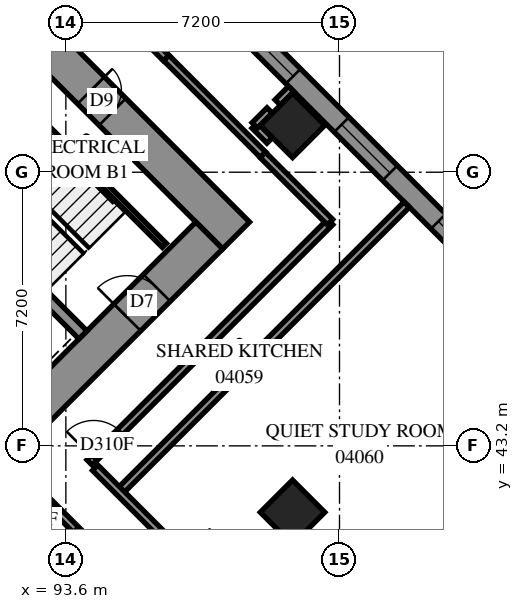
"""IFC4 building model, lengths in metres.
Left out: names, types, materials, properties, quantities, classifications, styles, units other than length and angle.
Written with IfcOpenShell. Run it as: python <this file> out.ifc"""

import sys

from ifc_helpers import new_model, si_unit, direction, frame, frame_2d, origin, origin_2d, place, context, subcontext, project, spatial, polyline, rectangle, outline, extrude, element, fill, save


model = new_model("IFC4")
c1 = context("Model", 3, precision=1e-05, world=origin(), true_north=direction((0.0, 1.0)))
c2 = subcontext(c1, "Body", "Model", "MODEL_VIEW")
j1 = project(units=[si_unit("LENGTHUNIT", "METRE"), si_unit("PLANEANGLEUNIT", "RADIAN")], contexts=[c1])
p1 = place(None, origin())
s1 = spatial("IfcSite", under=j1, at=p1, CompositionType="ELEMENT")
p2 = place(p1, origin())
s2 = spatial("IfcBuilding", under=s1, at=p2, CompositionType="ELEMENT")
p3 = place(p2, frame((0.0, 0.0, 18.6)))
s3 = spatial("IfcBuildingStorey", under=s2, at=p3, CompositionType="ELEMENT", Elevation=18.6)
for number, where, z_axis, x_axis in (
    (1, (99.565, 51.635, 0.0), (0.0, 0.0, 1.0), (0.707, -0.707, 0.0)),
    (2, (99.565, 41.453, 0.0), (0.0, 0.0, 1.0), (0.707, -0.707, 0.0)),
):
    element("IfcColumn", number, at=place(p3, frame(where, z_axis=z_axis, x_axis=x_axis)), inside=s3, PredefinedType="COLUMN", context=c2, shape_type="SweptSolid", body=[
        extrude(rectangle(XDim=1.2, YDim=1.2, at=origin_2d()), origin(), (0.0, 0.0, 1.0), 3.8),
    ])
p4 = place(p3, frame((86.483, 60.333, -0.4), z_axis=(0.0, 0.0, 1.0), x_axis=(0.70710983, -0.7071037324, 0.0)))
e3 = element("IfcWall", 3, at=p4, inside=s3, PredefinedType="SHEAR", context=c2, shape_type="SweptSolid", body=[
    extrude(rectangle(XDim=16.4, YDim=1.0, at=frame_2d((8.2, 0.0))), origin(), (0.0, 0.0, 1.0), 3.5),
])
p5 = place(p4, frame((11.0, 0.0, 0.4)))
e4 = element("IfcOpeningElement", 4, at=p5, cuts=e3, PredefinedType="OPENING", context=c2, shape_type="SweptSolid", body=[
    extrude(rectangle(XDim=0.8, YDim=2.1, at=frame_2d((0.4, 1.05))), frame((0.0, 0.51, 0.0), z_axis=(0.0, -1.0, 0.0), x_axis=(1.0, 0.0, 0.0)), (0.0, 0.0, 1.0), 1.02),
])
p6 = place(p3, frame((87.19, 38.554, -0.4), z_axis=(0.0, 0.0, 1.0), x_axis=(0.707103309, 0.7071102534, 0.0)))
e5 = element("IfcWall", 5, at=p6, inside=s3, PredefinedType="SHEAR", context=c2, shape_type="SweptSolid", body=[
    extrude(rectangle(XDim=14.4, YDim=1.0, at=frame_2d((7.2, 0.0))), origin(), (0.0, 0.0, 1.0), 3.5),
])
p7 = place(p6, frame((4.55, 0.0, 0.4)))
e6 = element("IfcOpeningElement", 6, at=p7, cuts=e5, PredefinedType="OPENING", context=c2, shape_type="SweptSolid", body=[
    extrude(rectangle(XDim=1.1, YDim=2.1, at=frame_2d((0.55, 1.05))), frame((0.0, 0.51, 0.0), z_axis=(0.0, -1.0, 0.0), x_axis=(1.0, 0.0, 0.0)), (0.0, 0.0, 1.0), 1.02),
])
p8 = place(p6, frame((11.35, 0.0, 0.4)))
e7 = element("IfcOpeningElement", 7, at=p8, cuts=e5, PredefinedType="OPENING", context=c2, shape_type="SweptSolid", body=[
    extrude(rectangle(XDim=1.1, YDim=2.1, at=frame_2d((0.55, 1.05))), frame((0.0, 0.51, 0.0), z_axis=(0.0, -1.0, 0.0), x_axis=(1.0, 0.0, 0.0)), (0.0, 0.0, 1.0), 1.02),
])
p9 = place(p3, frame((88.958, 51.211, 0.0), z_axis=(0.0, 0.0, 1.0), x_axis=(0.7070998367, -0.7071137256, 0.0)))
e8 = element("IfcWall", 8, at=p9, inside=s3, PredefinedType="SOLIDWALL", context=c2, shape_type="SweptSolid", body=[
    extrude(rectangle(XDim=7.2, YDim=0.3, at=frame_2d((3.6, 0.0))), origin(), (0.0, 0.0, 1.0), 3.8),
])
p10 = place(p3, frame((117.843, 34.665, 0.0), z_axis=(0.0, 0.0, 1.0), x_axis=(-0.7071067812, 0.7071067812, 0.0)))
e9 = element("IfcWall", 9, at=p10, inside=s3, PredefinedType="SOLIDWALL", context=c2, shape_type="SweptSolid", body=[
    extrude(outline(polyline([(-0.275, -0.275), (54.222, -0.275), (53.994, 0.275), (0.275, 0.275), (-0.275, -0.275)])), origin(), (0.0, 0.0, 1.0), 3.8),
])
p11 = place(p10, frame((0.8, 0.0, 0.7)))
e10 = element("IfcOpeningElement", 10, at=p11, cuts=e9, PredefinedType="OPENING", context=c2, shape_type="SweptSolid", body=[
    extrude(rectangle(XDim=1.8, YDim=2.4, at=frame_2d((0.9, 1.2))), frame((0.0, 0.285, 0.0), z_axis=(0.0, -1.0, 0.0), x_axis=(1.0, 0.0, 0.0)), (0.0, 0.0, 1.0), 0.57),
])
p12 = place(p10, frame((4.225, 0.0, 0.7)))
e11 = element("IfcOpeningElement", 11, at=p12, cuts=e9, PredefinedType="OPENING", context=c2, shape_type="SweptSolid", body=[
    extrude(rectangle(XDim=1.8, YDim=2.4, at=frame_2d((0.9, 1.2))), frame((0.0, 0.285, 0.0), z_axis=(0.0, -1.0, 0.0), x_axis=(1.0, 0.0, 0.0)), (0.0, 0.0, 1.0), 0.57),
])
p13 = place(p10, frame((7.825, 0.0, 0.7)))
e12 = element("IfcOpeningElement", 12, at=p13, cuts=e9, PredefinedType="OPENING", context=c2, shape_type="SweptSolid", body=[
    extrude(rectangle(XDim=1.8, YDim=2.4, at=frame_2d((0.9, 1.2))), frame((0.0, 0.285, 0.0), z_axis=(0.0, -1.0, 0.0), x_axis=(1.0, 0.0, 0.0)), (0.0, 0.0, 1.0), 0.57),
])
p14 = place(p10, frame((11.425, 0.0, 0.7)))
e13 = element("IfcOpeningElement", 13, at=p14, cuts=e9, PredefinedType="OPENING", context=c2, shape_type="SweptSolid", body=[
    extrude(rectangle(XDim=1.8, YDim=2.4, at=frame_2d((0.9, 1.2))), frame((0.0, 0.285, 0.0), z_axis=(0.0, -1.0, 0.0), x_axis=(1.0, 0.0, 0.0)), (0.0, 0.0, 1.0), 0.57),
])
p15 = place(p10, frame((15.025, 0.0, 0.7)))
e14 = element("IfcOpeningElement", 14, at=p15, cuts=e9, PredefinedType="OPENING", context=c2, shape_type="SweptSolid", body=[
    extrude(rectangle(XDim=1.8, YDim=2.4, at=frame_2d((0.9, 1.2))), frame((0.0, 0.285, 0.0), z_axis=(0.0, -1.0, 0.0), x_axis=(1.0, 0.0, 0.0)), (0.0, 0.0, 1.0), 0.57),
])
p16 = place(p10, frame((18.625, 0.0, 0.7)))
e15 = element("IfcOpeningElement", 15, at=p16, cuts=e9, PredefinedType="OPENING", context=c2, shape_type="SweptSolid", body=[
    extrude(rectangle(XDim=1.8, YDim=2.4, at=frame_2d((0.9, 1.2))), frame((0.0, 0.285, 0.0), z_axis=(0.0, -1.0, 0.0), x_axis=(1.0, 0.0, 0.0)), (0.0, 0.0, 1.0), 0.57),
])
p17 = place(p10, frame((22.225, 0.0, 0.7)))
e16 = element("IfcOpeningElement", 16, at=p17, cuts=e9, PredefinedType="OPENING", context=c2, shape_type="SweptSolid", body=[
    extrude(rectangle(XDim=1.8, YDim=2.4, at=frame_2d((0.9, 1.2))), frame((0.0, 0.285, 0.0), z_axis=(0.0, -1.0, 0.0), x_axis=(1.0, 0.0, 0.0)), (0.0, 0.0, 1.0), 0.57),
])
p18 = place(p10, frame((25.825, 0.0, 0.7)))
e17 = element("IfcOpeningElement", 17, at=p18, cuts=e9, PredefinedType="OPENING", context=c2, shape_type="SweptSolid", body=[
    extrude(rectangle(XDim=1.8, YDim=2.4, at=frame_2d((0.9, 1.2))), frame((0.0, 0.285, 0.0), z_axis=(0.0, -1.0, 0.0), x_axis=(1.0, 0.0, 0.0)), (0.0, 0.0, 1.0), 0.57),
])
p19 = place(p10, frame((29.425, 0.0, 0.7)))
e18 = element("IfcOpeningElement", 18, at=p19, cuts=e9, PredefinedType="OPENING", context=c2, shape_type="SweptSolid", body=[
    extrude(rectangle(XDim=1.8, YDim=2.4, at=frame_2d((0.9, 1.2))), frame((0.0, 0.285, 0.0), z_axis=(0.0, -1.0, 0.0), x_axis=(1.0, 0.0, 0.0)), (0.0, 0.0, 1.0), 0.57),
])
p20 = place(p10, frame((33.025, 0.0, 0.7)))
e19 = element("IfcOpeningElement", 19, at=p20, cuts=e9, PredefinedType="OPENING", context=c2, shape_type="SweptSolid", body=[
    extrude(rectangle(XDim=1.8, YDim=2.4, at=frame_2d((0.9, 1.2))), frame((0.0, 0.285, 0.0), z_axis=(0.0, -1.0, 0.0), x_axis=(1.0, 0.0, 0.0)), (0.0, 0.0, 1.0), 0.57),
])
p21 = place(p10, frame((36.625, 0.0, 0.7)))
e20 = element("IfcOpeningElement", 20, at=p21, cuts=e9, PredefinedType="OPENING", context=c2, shape_type="SweptSolid", body=[
    extrude(rectangle(XDim=1.8, YDim=2.4, at=frame_2d((0.9, 1.2))), frame((0.0, 0.285, 0.0), z_axis=(0.0, -1.0, 0.0), x_axis=(1.0, 0.0, 0.0)), (0.0, 0.0, 1.0), 0.57),
])
p22 = place(p10, frame((40.225, 0.0, 0.7)))
e21 = element("IfcOpeningElement", 21, at=p22, cuts=e9, PredefinedType="OPENING", context=c2, shape_type="SweptSolid", body=[
    extrude(rectangle(XDim=1.8, YDim=2.4, at=frame_2d((0.9, 1.2))), frame((0.0, 0.285, 0.0), z_axis=(0.0, -1.0, 0.0), x_axis=(1.0, 0.0, 0.0)), (0.0, 0.0, 1.0), 0.57),
])
p23 = place(p10, frame((43.825, 0.0, 0.7)))
e22 = element("IfcOpeningElement", 22, at=p23, cuts=e9, PredefinedType="OPENING", context=c2, shape_type="SweptSolid", body=[
    extrude(rectangle(XDim=1.8, YDim=2.4, at=frame_2d((0.9, 1.2))), frame((0.0, 0.285, 0.0), z_axis=(0.0, -1.0, 0.0), x_axis=(1.0, 0.0, 0.0)), (0.0, 0.0, 1.0), 0.57),
])
p24 = place(p10, frame((47.425, 0.0, 0.7)))
e23 = element("IfcOpeningElement", 23, at=p24, cuts=e9, PredefinedType="OPENING", context=c2, shape_type="SweptSolid", body=[
    extrude(rectangle(XDim=1.8, YDim=2.4, at=frame_2d((0.9, 1.2))), frame((0.0, 0.285, 0.0), z_axis=(0.0, -1.0, 0.0), x_axis=(1.0, 0.0, 0.0)), (0.0, 0.0, 1.0), 0.57),
])
p25 = place(p10, frame((51.06, 0.0, 0.7)))
e24 = element("IfcOpeningElement", 24, at=p25, cuts=e9, PredefinedType="OPENING", context=c2, shape_type="SweptSolid", body=[
    extrude(rectangle(XDim=1.8, YDim=2.4, at=frame_2d((0.9, 1.2))), frame((0.0, 0.285, 0.0), z_axis=(0.0, -1.0, 0.0), x_axis=(1.0, 0.0, 0.0)), (0.0, 0.0, 1.0), 0.57),
])
p26 = place(p3, frame((77.07, 42.275, 0.0), z_axis=(0.0, 0.0, 1.0), x_axis=(0.7071067812, -0.7071067812, 0.0)))
e25 = element("IfcWall", 25, at=p26, inside=s3, PredefinedType="SOLIDWALL", context=c2, shape_type="SweptSolid", body=[
    extrude(outline(polyline([(0.114, -0.275), (39.288, -0.275), (38.737, 0.275), (-0.114, 0.275), (0.114, -0.275)])), origin(), (0.0, 0.0, 1.0), 3.8),
])
p27 = place(p26, frame((2.837, 0.0, 0.7)))
e26 = element("IfcOpeningElement", 26, at=p27, cuts=e25, PredefinedType="OPENING", context=c2, shape_type="SweptSolid", body=[
    extrude(rectangle(XDim=1.8, YDim=2.4, at=frame_2d((0.9, 1.2))), frame((0.0, 0.285, 0.0), z_axis=(0.0, -1.0, 0.0), x_axis=(1.0, 0.0, 0.0)), (0.0, 0.0, 1.0), 0.57),
])
p28 = place(p26, frame((6.588, 0.0, 0.7)))
e27 = element("IfcOpeningElement", 27, at=p28, cuts=e25, PredefinedType="OPENING", context=c2, shape_type="SweptSolid", body=[
    extrude(rectangle(XDim=1.8, YDim=2.4, at=frame_2d((0.9, 1.2))), frame((0.0, 0.285, 0.0), z_axis=(0.0, -1.0, 0.0), x_axis=(1.0, 0.0, 0.0)), (0.0, 0.0, 1.0), 0.57),
])
p29 = place(p26, frame((10.188, 0.0, 0.7)))
e28 = element("IfcOpeningElement", 28, at=p29, cuts=e25, PredefinedType="OPENING", context=c2, shape_type="SweptSolid", body=[
    extrude(rectangle(XDim=1.8, YDim=2.4, at=frame_2d((0.9, 1.2))), frame((0.0, 0.285, 0.0), z_axis=(0.0, -1.0, 0.0), x_axis=(1.0, 0.0, 0.0)), (0.0, 0.0, 1.0), 0.57),
])
p30 = place(p26, frame((13.787, 0.0, 0.7)))
e29 = element("IfcOpeningElement", 29, at=p30, cuts=e25, PredefinedType="OPENING", context=c2, shape_type="SweptSolid", body=[
    extrude(rectangle(XDim=1.8, YDim=2.4, at=frame_2d((0.9, 1.2))), frame((0.0, 0.285, 0.0), z_axis=(0.0, -1.0, 0.0), x_axis=(1.0, 0.0, 0.0)), (0.0, 0.0, 1.0), 0.57),
])
p31 = place(p26, frame((17.387, 0.0, 0.7)))
e30 = element("IfcOpeningElement", 30, at=p31, cuts=e25, PredefinedType="OPENING", context=c2, shape_type="SweptSolid", body=[
    extrude(rectangle(XDim=1.8, YDim=2.4, at=frame_2d((0.9, 1.2))), frame((0.0, 0.285, 0.0), z_axis=(0.0, -1.0, 0.0), x_axis=(1.0, 0.0, 0.0)), (0.0, 0.0, 1.0), 0.57),
])
p32 = place(p26, frame((20.988, 0.0, 0.7)))
e31 = element("IfcOpeningElement", 31, at=p32, cuts=e25, PredefinedType="OPENING", context=c2, shape_type="SweptSolid", body=[
    extrude(rectangle(XDim=1.8, YDim=2.4, at=frame_2d((0.9, 1.2))), frame((0.0, 0.285, 0.0), z_axis=(0.0, -1.0, 0.0), x_axis=(1.0, 0.0, 0.0)), (0.0, 0.0, 1.0), 0.57),
])
p33 = place(p26, frame((24.587, 0.0, 0.7)))
e32 = element("IfcOpeningElement", 32, at=p33, cuts=e25, PredefinedType="OPENING", context=c2, shape_type="SweptSolid", body=[
    extrude(rectangle(XDim=1.8, YDim=2.4, at=frame_2d((0.9, 1.2))), frame((0.0, 0.285, 0.0), z_axis=(0.0, -1.0, 0.0), x_axis=(1.0, 0.0, 0.0)), (0.0, 0.0, 1.0), 0.57),
])
p34 = place(p26, frame((28.188, 0.0, 0.7)))
e33 = element("IfcOpeningElement", 33, at=p34, cuts=e25, PredefinedType="OPENING", context=c2, shape_type="SweptSolid", body=[
    extrude(rectangle(XDim=1.8, YDim=2.4, at=frame_2d((0.9, 1.2))), frame((0.0, 0.285, 0.0), z_axis=(0.0, -1.0, 0.0), x_axis=(1.0, 0.0, 0.0)), (0.0, 0.0, 1.0), 0.57),
])
p35 = place(p26, frame((31.788, 0.0, 0.7)))
e34 = element("IfcOpeningElement", 34, at=p35, cuts=e25, PredefinedType="OPENING", context=c2, shape_type="SweptSolid", body=[
    extrude(rectangle(XDim=1.8, YDim=2.4, at=frame_2d((0.9, 1.2))), frame((0.0, 0.285, 0.0), z_axis=(0.0, -1.0, 0.0), x_axis=(1.0, 0.0, 0.0)), (0.0, 0.0, 1.0), 0.57),
])
p36 = place(p26, frame((35.388, 0.0, 0.7)))
e35 = element("IfcOpeningElement", 35, at=p36, cuts=e25, PredefinedType="OPENING", context=c2, shape_type="SweptSolid", body=[
    extrude(rectangle(XDim=1.8, YDim=2.4, at=frame_2d((0.9, 1.2))), frame((0.0, 0.285, 0.0), z_axis=(0.0, -1.0, 0.0), x_axis=(1.0, 0.0, 0.0)), (0.0, 0.0, 1.0), 0.57),
])
p37 = place(p3, frame((91.313, 53.354, 0.0), z_axis=(0.0, 0.0, 1.0), x_axis=(0.7071140275, -0.7070995348, 0.0)))
e36 = element("IfcWall", 36, at=p37, inside=s3, PredefinedType="PARTITIONING", context=c2, shape_type="SweptSolid", body=[
    extrude(rectangle(XDim=6.9, YDim=0.15, at=frame_2d((3.45, 0.0))), origin(), (0.0, 0.0, 1.0), 3.8),
])
p38 = place(p3, frame((93.163, 41.697, 0.0), z_axis=(0.0, 0.0, 1.0), x_axis=(0.7071067812, -0.7071067812, 0.0)))
e37 = element("IfcWall", 37, at=p38, inside=s3, PredefinedType="PARTITIONING", context=c2, shape_type="SweptSolid", body=[
    extrude(rectangle(XDim=26.299, YDim=0.2, at=frame_2d((13.149, 0.0))), origin(), (0.0, 0.0, 1.0), 3.8),
])
p39 = place(p38, frame((3.437, 0.0, 0.0)))
e38 = element("IfcOpeningElement", 38, at=p39, cuts=e37, PredefinedType="OPENING", context=c2, shape_type="SweptSolid", body=[
    extrude(rectangle(XDim=1.0, YDim=2.1, at=frame_2d((0.5, 1.05))), frame((0.0, 0.11, 0.0), z_axis=(0.0, -1.0, 0.0), x_axis=(1.0, 0.0, 0.0)), (0.0, 0.0, 1.0), 0.22),
])
p40 = place(p38, frame((10.637, 0.0, 0.0)))
e39 = element("IfcOpeningElement", 39, at=p40, cuts=e37, PredefinedType="OPENING", context=c2, shape_type="SweptSolid", body=[
    extrude(rectangle(XDim=1.0, YDim=2.1, at=frame_2d((0.5, 1.05))), frame((0.0, 0.11, 0.0), z_axis=(0.0, -1.0, 0.0), x_axis=(1.0, 0.0, 0.0)), (0.0, 0.0, 1.0), 0.22),
])
p41 = place(p38, frame((16.024, 0.0, 0.0)))
e40 = element("IfcOpeningElement", 40, at=p41, cuts=e37, PredefinedType="OPENING", context=c2, shape_type="SweptSolid", body=[
    extrude(rectangle(XDim=1.0, YDim=2.1, at=frame_2d((0.5, 1.05))), frame((0.0, 0.11, 0.0), z_axis=(0.0, -1.0, 0.0), x_axis=(1.0, 0.0, 0.0)), (0.0, 0.0, 1.0), 0.22),
])
p42 = place(p38, frame((22.657, 0.0, 0.0)))
e41 = element("IfcOpeningElement", 41, at=p42, cuts=e37, PredefinedType="OPENING", context=c2, shape_type="SweptSolid", body=[
    extrude(rectangle(XDim=1.0, YDim=2.1, at=frame_2d((0.5, 1.05))), frame((0.0, 0.11, 0.0), z_axis=(0.0, -1.0, 0.0), x_axis=(1.0, 0.0, 0.0)), (0.0, 0.0, 1.0), 0.22),
])
p43 = place(p3, frame((86.833, 62.805, 0.0), z_axis=(0.0, 0.0, 1.0), x_axis=(0.7072045138, -0.7070090351, 0.0)))
e42 = element("IfcWall", 42, at=p43, inside=s3, PredefinedType="PARTITIONING", context=c2, shape_type="SweptSolid", body=[
    extrude(rectangle(XDim=13.301, YDim=0.2, at=frame_2d((6.65, 0.0))), origin(), (0.0, 0.0, 1.0), 3.8),
])
p44 = place(p43, frame((10.586, 0.0, 0.0)))
e43 = element("IfcOpeningElement", 43, at=p44, cuts=e42, PredefinedType="OPENING", context=c2, shape_type="SweptSolid", body=[
    extrude(rectangle(XDim=1.0, YDim=2.1, at=frame_2d((0.5, 1.05))), frame((0.0, 0.11, 0.0), z_axis=(0.0, -1.0, 0.0), x_axis=(1.0, 0.0, 0.0)), (0.0, 0.0, 1.0), 0.22),
])
for number, where, z_axis, x_axis in (
    (44, (95.003, 41.985, 0.0), (0.0, 0.0, 1.0), (0.707, 0.707, 0.0)),
    (45, (100.095, 36.893, 0.0), (0.0, 0.0, 1.0), (0.707, 0.707, 0.0)),
):
    element("IfcWall", number, at=place(p3, frame(where, z_axis=z_axis, x_axis=x_axis)), inside=s3, PredefinedType="PARTITIONING", context=c2, shape_type="SweptSolid", body=[
        extrude(rectangle(XDim=10.699, YDim=0.2, at=frame_2d((5.35, 0.0))), origin(), (0.0, 0.0, 1.0), 3.8),
    ])
p45 = place(p3, frame((94.226, 42.762, 0.0), z_axis=(0.0, 0.0, 1.0), x_axis=(0.7071067812, 0.7071067812, 0.0)))
e46 = element("IfcWall", 46, at=p45, inside=s3, PredefinedType="PARTITIONING", context=c2, shape_type="SweptSolid", body=[
    extrude(rectangle(XDim=8.949, YDim=0.2, at=frame_2d((4.474, 0.0))), origin(), (0.0, 0.0, 1.0), 3.8),
])
p46 = place(p45, frame((0.149, 0.0, 0.0)))
e47 = element("IfcOpeningElement", 47, at=p46, cuts=e46, PredefinedType="OPENING", context=c2, shape_type="SweptSolid", body=[
    extrude(rectangle(XDim=1.0, YDim=2.1, at=frame_2d((0.5, 1.05))), frame((0.0, 0.11, 0.0), z_axis=(0.0, -1.0, 0.0), x_axis=(1.0, 0.0, 0.0)), (0.0, 0.0, 1.0), 0.22),
])
p47 = place(p3, frame((94.371, 42.623, 0.0), z_axis=(0.0, 0.0, 1.0), x_axis=(0.7071067812, -0.7071067812, 0.0)))
e48 = element("IfcWall", 48, at=p47, inside=s3, PredefinedType="PARTITIONING", context=c2, shape_type="SweptSolid", body=[
    extrude(outline(polyline([(0.0, -0.1), (11.7, -0.1), (11.7, 0.1), (0.0, 0.1), (0.0, -0.1)])), origin(), (0.0, 0.0, 1.0), 3.8),
])
p48 = place(p47, frame((3.274, 0.0, 0.0)))
e49 = element("IfcOpeningElement", 49, at=p48, cuts=e48, PredefinedType="OPENING", context=c2, shape_type="SweptSolid", body=[
    extrude(rectangle(XDim=1.0, YDim=2.1, at=frame_2d((0.5, 1.05))), frame((0.0, 0.11, 0.0), z_axis=(0.0, -1.0, 0.0), x_axis=(1.0, 0.0, 0.0)), (0.0, 0.0, 1.0), 0.22),
])
p49 = place(p47, frame((10.473, 0.0, 0.0)))
e50 = element("IfcOpeningElement", 50, at=p49, cuts=e48, PredefinedType="OPENING", context=c2, shape_type="SweptSolid", body=[
    extrude(rectangle(XDim=1.0, YDim=2.1, at=frame_2d((0.5, 1.05))), frame((0.0, 0.11, 0.0), z_axis=(0.0, -1.0, 0.0), x_axis=(1.0, 0.0, 0.0)), (0.0, 0.0, 1.0), 0.22),
])
p50 = place(p3, frame((96.244, 53.406, 0.0), z_axis=(0.0, 0.0, 1.0), x_axis=(0.7068288851, -0.7073845681, 0.0)))
e51 = element("IfcWall", 51, at=p50, inside=s3, PredefinedType="PARTITIONING", context=c2, shape_type="SweptSolid", body=[
    extrude(rectangle(XDim=3.599, YDim=0.2, at=frame_2d((1.8, 0.0))), origin(), (0.0, 0.0, 1.0), 3.8),
])
p51 = place(p3, frame((98.783, 50.855, 0.0), z_axis=(0.0, 0.0, 1.0), x_axis=(0.7071067812, -0.7071067812, 0.0)))
e52 = element("IfcWall", 52, at=p51, inside=s3, PredefinedType="PARTITIONING", context=c2, shape_type="SweptSolid", body=[
    extrude(rectangle(XDim=2.5, YDim=0.2, at=frame_2d((1.25, 0.0))), origin(), (0.0, 0.0, 1.0), 3.8),
])
p52 = place(p3, frame((98.569, 51.629, 0.0), z_axis=(0.0, 0.0, 1.0), x_axis=(0.705305244, -0.7089037401, 0.0)))
e53 = element("IfcWall", 53, at=p52, inside=s3, PredefinedType="PARTITIONING", context=c2, shape_type="SweptSolid", body=[
    extrude(rectangle(XDim=0.556, YDim=0.2, at=frame_2d((0.278, 0.0))), origin(), (0.0, 0.0, 1.0), 3.8),
])
p53 = place(p3, frame((98.571, 51.633, 0.0), z_axis=(0.0, 0.0, 1.0), x_axis=(0.7071067812, 0.7071067812, 0.0)))
e54 = element("IfcWall", 54, at=p53, inside=s3, PredefinedType="PARTITIONING", context=c2, shape_type="SweptSolid", body=[
    extrude(rectangle(XDim=0.554, YDim=0.2, at=frame_2d((0.277, 0.0))), origin(), (0.0, 0.0, 1.0), 3.8),
])
p54 = place(p3, frame((99.175, 52.237, 0.0), z_axis=(0.0, 0.0, 1.0), x_axis=(0.7070068014, 0.7072067468, 0.0)))
e55 = element("IfcWall", 55, at=p54, inside=s3, PredefinedType="PARTITIONING", context=c2, shape_type="SweptSolid", body=[
    extrude(rectangle(XDim=0.5, YDim=0.2, at=frame_2d((0.25, 0.0))), origin(), (0.0, 0.0, 1.0), 3.8),
])
p55 = place(p16, origin())
e56 = element("IfcWindow", 56, at=p55, inside=s3, PartitioningType="SINGLE_PANEL", PredefinedType="WINDOW", context=c2, shape_type="SweptSolid", body=[
    extrude(rectangle(XDim=1.8, YDim=2.4, at=frame_2d((0.9, 1.2))), frame((0.0, 0.155, 0.0), z_axis=(0.0, -1.0, 0.0), x_axis=(1.0, 0.0, 0.0)), (0.0, 0.0, 1.0), 0.06),
])
fill(e15, e56)
p56 = place(p17, origin())
e57 = element("IfcWindow", 57, at=p56, inside=s3, PartitioningType="SINGLE_PANEL", PredefinedType="WINDOW", context=c2, shape_type="SweptSolid", body=[
    extrude(rectangle(XDim=1.8, YDim=2.4, at=frame_2d((0.9, 1.2))), frame((0.0, 0.155, 0.0), z_axis=(0.0, -1.0, 0.0), x_axis=(1.0, 0.0, 0.0)), (0.0, 0.0, 1.0), 0.06),
])
fill(e16, e57)
p57 = place(p18, origin())
e58 = element("IfcWindow", 58, at=p57, inside=s3, PartitioningType="SINGLE_PANEL", PredefinedType="WINDOW", context=c2, shape_type="SweptSolid", body=[
    extrude(rectangle(XDim=1.8, YDim=2.4, at=frame_2d((0.9, 1.2))), frame((0.0, 0.155, 0.0), z_axis=(0.0, -1.0, 0.0), x_axis=(1.0, 0.0, 0.0)), (0.0, 0.0, 1.0), 0.06),
])
fill(e17, e58)
p58 = place(p5, origin())
e59 = element("IfcDoor", 59, at=p58, inside=s3, OperationType="SINGLE_SWING_RIGHT", PredefinedType="DOOR", context=c2, shape_type="SweptSolid", body=[
    extrude(rectangle(XDim=0.8, YDim=2.1, at=frame_2d((0.4, 1.05))), frame((0.0, -0.44, 0.0), z_axis=(0.0, -1.0, 0.0), x_axis=(1.0, 0.0, 0.0)), (0.0, 0.0, 1.0), 0.05),
])
fill(e4, e59)
p59 = place(p8, origin())
e60 = element("IfcDoor", 60, at=p59, inside=s3, OperationType="SINGLE_SWING_RIGHT", PredefinedType="DOOR", context=c2, shape_type="SweptSolid", body=[
    extrude(rectangle(XDim=1.1, YDim=2.1, at=frame_2d((0.55, 1.05))), frame((0.0, 0.025, 0.0), z_axis=(0.0, -1.0, 0.0), x_axis=(1.0, 0.0, 0.0)), (0.0, 0.0, 1.0), 0.05),
])
fill(e7, e60)
p60 = place(p46, origin())
e61 = element("IfcDoor", 61, at=p60, inside=s3, OperationType="SINGLE_SWING_LEFT", PredefinedType="DOOR", context=c2, shape_type="SweptSolid", body=[
    extrude(rectangle(XDim=1.0, YDim=2.1, at=frame_2d((0.5, 1.05))), frame((0.0, 0.025, 0.0), z_axis=(0.0, -1.0, 0.0), x_axis=(1.0, 0.0, 0.0)), (0.0, 0.0, 1.0), 0.05),
])
fill(e47, e61)
save(model, sys.argv[1])
